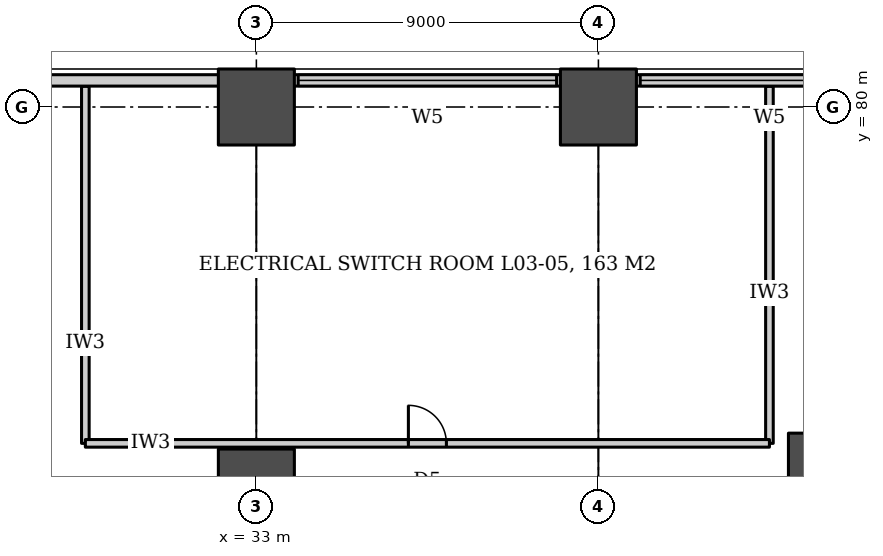
"""IFC4 building model, lengths in metres.
Left out: names, types, materials, properties, quantities, classifications, styles, units other than length and angle.
Written with IfcOpenShell. Run it as: python <this file> out.ifc"""

import sys

from ifc_helpers import new_model, si_unit, direction, frame, frame_2d, origin, origin_2d, place, context, subcontext, project, spatial, rectangle, circle, extrude, element, fill, save


model = new_model("IFC4")
c1 = context("Model", 3, precision=1e-05, world=origin(), true_north=direction((0.0, 1.0)))
c2 = subcontext(c1, "Body", "Model", "MODEL_VIEW")
j1 = project(units=[si_unit("LENGTHUNIT", "METRE"), si_unit("PLANEANGLEUNIT", "RADIAN")], contexts=[c1])
p1 = place(None, origin())
s1 = spatial("IfcSite", under=j1, at=p1, CompositionType="ELEMENT")
p2 = place(p1, origin())
s2 = spatial("IfcBuilding", under=s1, at=p2, CompositionType="ELEMENT")
p3 = place(p2, frame((0.0, 0.0, 20.0)))
s3 = spatial("IfcBuildingStorey", under=s2, at=p3, CompositionType="ELEMENT", Elevation=20.0)
for number, where, z_axis, x_axis in (
    (1, (33.0, 70.0, 0.0), (0.0, 0.0, 1.0), (1.0, 0.0, 0.0)),
    (2, (33.0, 80.0, 0.0), (0.0, 0.0, 1.0), (1.0, 0.0, 0.0)),
    (3, (42.0, 80.0, 0.0), (0.0, 0.0, 1.0), (1.0, 0.0, 0.0)),
):
    element("IfcColumn", number, at=place(p3, frame(where, z_axis=z_axis, x_axis=x_axis)), inside=s3, PredefinedType="COLUMN", context=c2, shape_type="SweptSolid", body=[
        extrude(rectangle(XDim=2.0, YDim=2.0, at=origin_2d()), origin(), (0.0, 0.0, 1.0), 6.0),
    ])
p4 = place(p3, frame((48.5, 69.919, 0.0), z_axis=(0.0, 0.0, 1.0), x_axis=(1.0, 0.0, 0.0)))
e4 = element("IfcColumn", 4, at=p4, inside=s3, PredefinedType="COLUMN", context=c2, shape_type="SweptSolid", body=[
    extrude(circle(Radius=1.5, at=origin_2d()), origin(), (0.0, 0.0, 1.0), 6.0),
])
for number, where, z_axis, x_axis in (
    (5, (28.5, 71.15, 0.0), (0.0, 0.0, 1.0), (0.0, 1.0, 0.0)),
    (6, (46.5, 71.15, 0.0), (0.0, 0.0, 1.0), (0.0, 1.0, 0.0)),
):
    element("IfcWall", number, at=place(p3, frame(where, z_axis=z_axis, x_axis=x_axis)), inside=s3, PredefinedType="PARTITIONING", context=c2, shape_type="SweptSolid", body=[
        extrude(rectangle(XDim=9.395, YDim=0.2, at=frame_2d((4.698, 0.0))), origin(), (0.0, 0.0, 1.0), 2.88),
    ])
p5 = place(p3, frame((28.5, 71.15, 0.0), z_axis=(0.0, 0.0, 1.0), x_axis=(1.0, 0.0, 0.0)))
e7 = element("IfcWall", 7, at=p5, inside=s3, PredefinedType="PARTITIONING", context=c2, shape_type="SweptSolid", body=[
    extrude(rectangle(XDim=18.0, YDim=0.2, at=frame_2d((9.0, 0.0))), origin(), (0.0, 0.0, 1.0), 2.88),
])
p6 = place(p5, frame((8.5, 0.0, 0.0)))
e8 = element("IfcOpeningElement", 8, at=p6, cuts=e7, PredefinedType="OPENING", context=c2, shape_type="SweptSolid", body=[
    extrude(rectangle(XDim=1.0, YDim=2.1, at=frame_2d((0.5, 1.05))), frame((0.0, 0.11, 0.0), z_axis=(0.0, -1.0, 0.0), x_axis=(1.0, 0.0, 0.0)), (0.0, 0.0, 1.0), 0.22),
])
p7 = place(p3, frame((95.0, 80.7, 0.0), z_axis=(0.0, 0.0, 1.0), x_axis=(-1.0, 0.0, 0.0)))
e9 = element("IfcWall", 9, at=p7, inside=s3, PredefinedType="SOLIDWALL", context=c2, shape_type="SweptSolid", body=[
    extrude(rectangle(XDim=70.0, YDim=0.3, at=frame_2d((35.0, 0.0))), origin(), (0.0, 0.0, 1.0), 5.7),
])
p8 = place(p7, frame((54.1, 0.0, 1.8)))
e10 = element("IfcOpeningElement", 10, at=p8, cuts=e9, PredefinedType="OPENING", context=c2, shape_type="SweptSolid", body=[
    extrude(rectangle(XDim=6.8, YDim=2.4, at=frame_2d((3.4, 1.2))), frame((0.0, 0.16, 0.0), z_axis=(0.0, -1.0, 0.0), x_axis=(1.0, 0.0, 0.0)), (0.0, 0.0, 1.0), 0.32),
])
p9 = place(p7, frame((45.1, 0.0, 1.8)))
e11 = element("IfcOpeningElement", 11, at=p9, cuts=e9, PredefinedType="OPENING", context=c2, shape_type="SweptSolid", body=[
    extrude(rectangle(XDim=6.8, YDim=2.4, at=frame_2d((3.4, 1.2))), frame((0.0, 0.16, 0.0), z_axis=(0.0, -1.0, 0.0), x_axis=(1.0, 0.0, 0.0)), (0.0, 0.0, 1.0), 0.32),
])
p10 = place(p7, frame((36.1, 0.0, 1.8)))
e12 = element("IfcOpeningElement", 12, at=p10, cuts=e9, PredefinedType="OPENING", context=c2, shape_type="SweptSolid", body=[
    extrude(rectangle(XDim=6.8, YDim=2.4, at=frame_2d((3.4, 1.2))), frame((0.0, 0.16, 0.0), z_axis=(0.0, -1.0, 0.0), x_axis=(1.0, 0.0, 0.0)), (0.0, 0.0, 1.0), 0.32),
])
p11 = place(p7, frame((27.1, 0.0, 1.8)))
e13 = element("IfcOpeningElement", 13, at=p11, cuts=e9, PredefinedType="OPENING", context=c2, shape_type="SweptSolid", body=[
    extrude(rectangle(XDim=6.8, YDim=2.4, at=frame_2d((3.4, 1.2))), frame((0.0, 0.16, 0.0), z_axis=(0.0, -1.0, 0.0), x_axis=(1.0, 0.0, 0.0)), (0.0, 0.0, 1.0), 0.32),
])
p12 = place(p7, frame((18.1, 0.0, 1.8)))
e14 = element("IfcOpeningElement", 14, at=p12, cuts=e9, PredefinedType="OPENING", context=c2, shape_type="SweptSolid", body=[
    extrude(rectangle(XDim=6.8, YDim=2.4, at=frame_2d((3.4, 1.2))), frame((0.0, 0.16, 0.0), z_axis=(0.0, -1.0, 0.0), x_axis=(1.0, 0.0, 0.0)), (0.0, 0.0, 1.0), 0.32),
])
p13 = place(p7, frame((9.1, 0.0, 1.8)))
e15 = element("IfcOpeningElement", 15, at=p13, cuts=e9, PredefinedType="OPENING", context=c2, shape_type="SweptSolid", body=[
    extrude(rectangle(XDim=6.8, YDim=2.4, at=frame_2d((3.4, 1.2))), frame((0.0, 0.16, 0.0), z_axis=(0.0, -1.0, 0.0), x_axis=(1.0, 0.0, 0.0)), (0.0, 0.0, 1.0), 0.32),
])
p14 = place(p6, origin())
e16 = element("IfcDoor", 16, at=p14, inside=s3, OperationType="SINGLE_SWING_LEFT", PredefinedType="DOOR", context=c2, shape_type="SweptSolid", body=[
    extrude(rectangle(XDim=1.0, YDim=2.1, at=frame_2d((0.5, 1.05))), frame((0.0, 0.025, 0.0), z_axis=(0.0, -1.0, 0.0), x_axis=(1.0, 0.0, 0.0)), (0.0, 0.0, 1.0), 0.05),
])
fill(e8, e16)
p15 = place(p8, origin())
e17 = element("IfcWindow", 17, at=p15, inside=s3, PartitioningType="SINGLE_PANEL", PredefinedType="WINDOW", context=c2, shape_type="SweptSolid", body=[
    extrude(rectangle(XDim=6.8, YDim=2.4, at=frame_2d((3.4, 1.2))), frame((0.0, 0.03, 0.0), z_axis=(0.0, -1.0, 0.0), x_axis=(1.0, 0.0, 0.0)), (0.0, 0.0, 1.0), 0.06),
])
fill(e10, e17)
p16 = place(p9, origin())
e18 = element("IfcWindow", 18, at=p16, inside=s3, PartitioningType="SINGLE_PANEL", PredefinedType="WINDOW", context=c2, shape_type="SweptSolid", body=[
    extrude(rectangle(XDim=6.8, YDim=2.4, at=frame_2d((3.4, 1.2))), frame((0.0, 0.03, 0.0), z_axis=(0.0, -1.0, 0.0), x_axis=(1.0, 0.0, 0.0)), (0.0, 0.0, 1.0), 0.06),
])
fill(e11, e18)
save(model, sys.argv[1])
